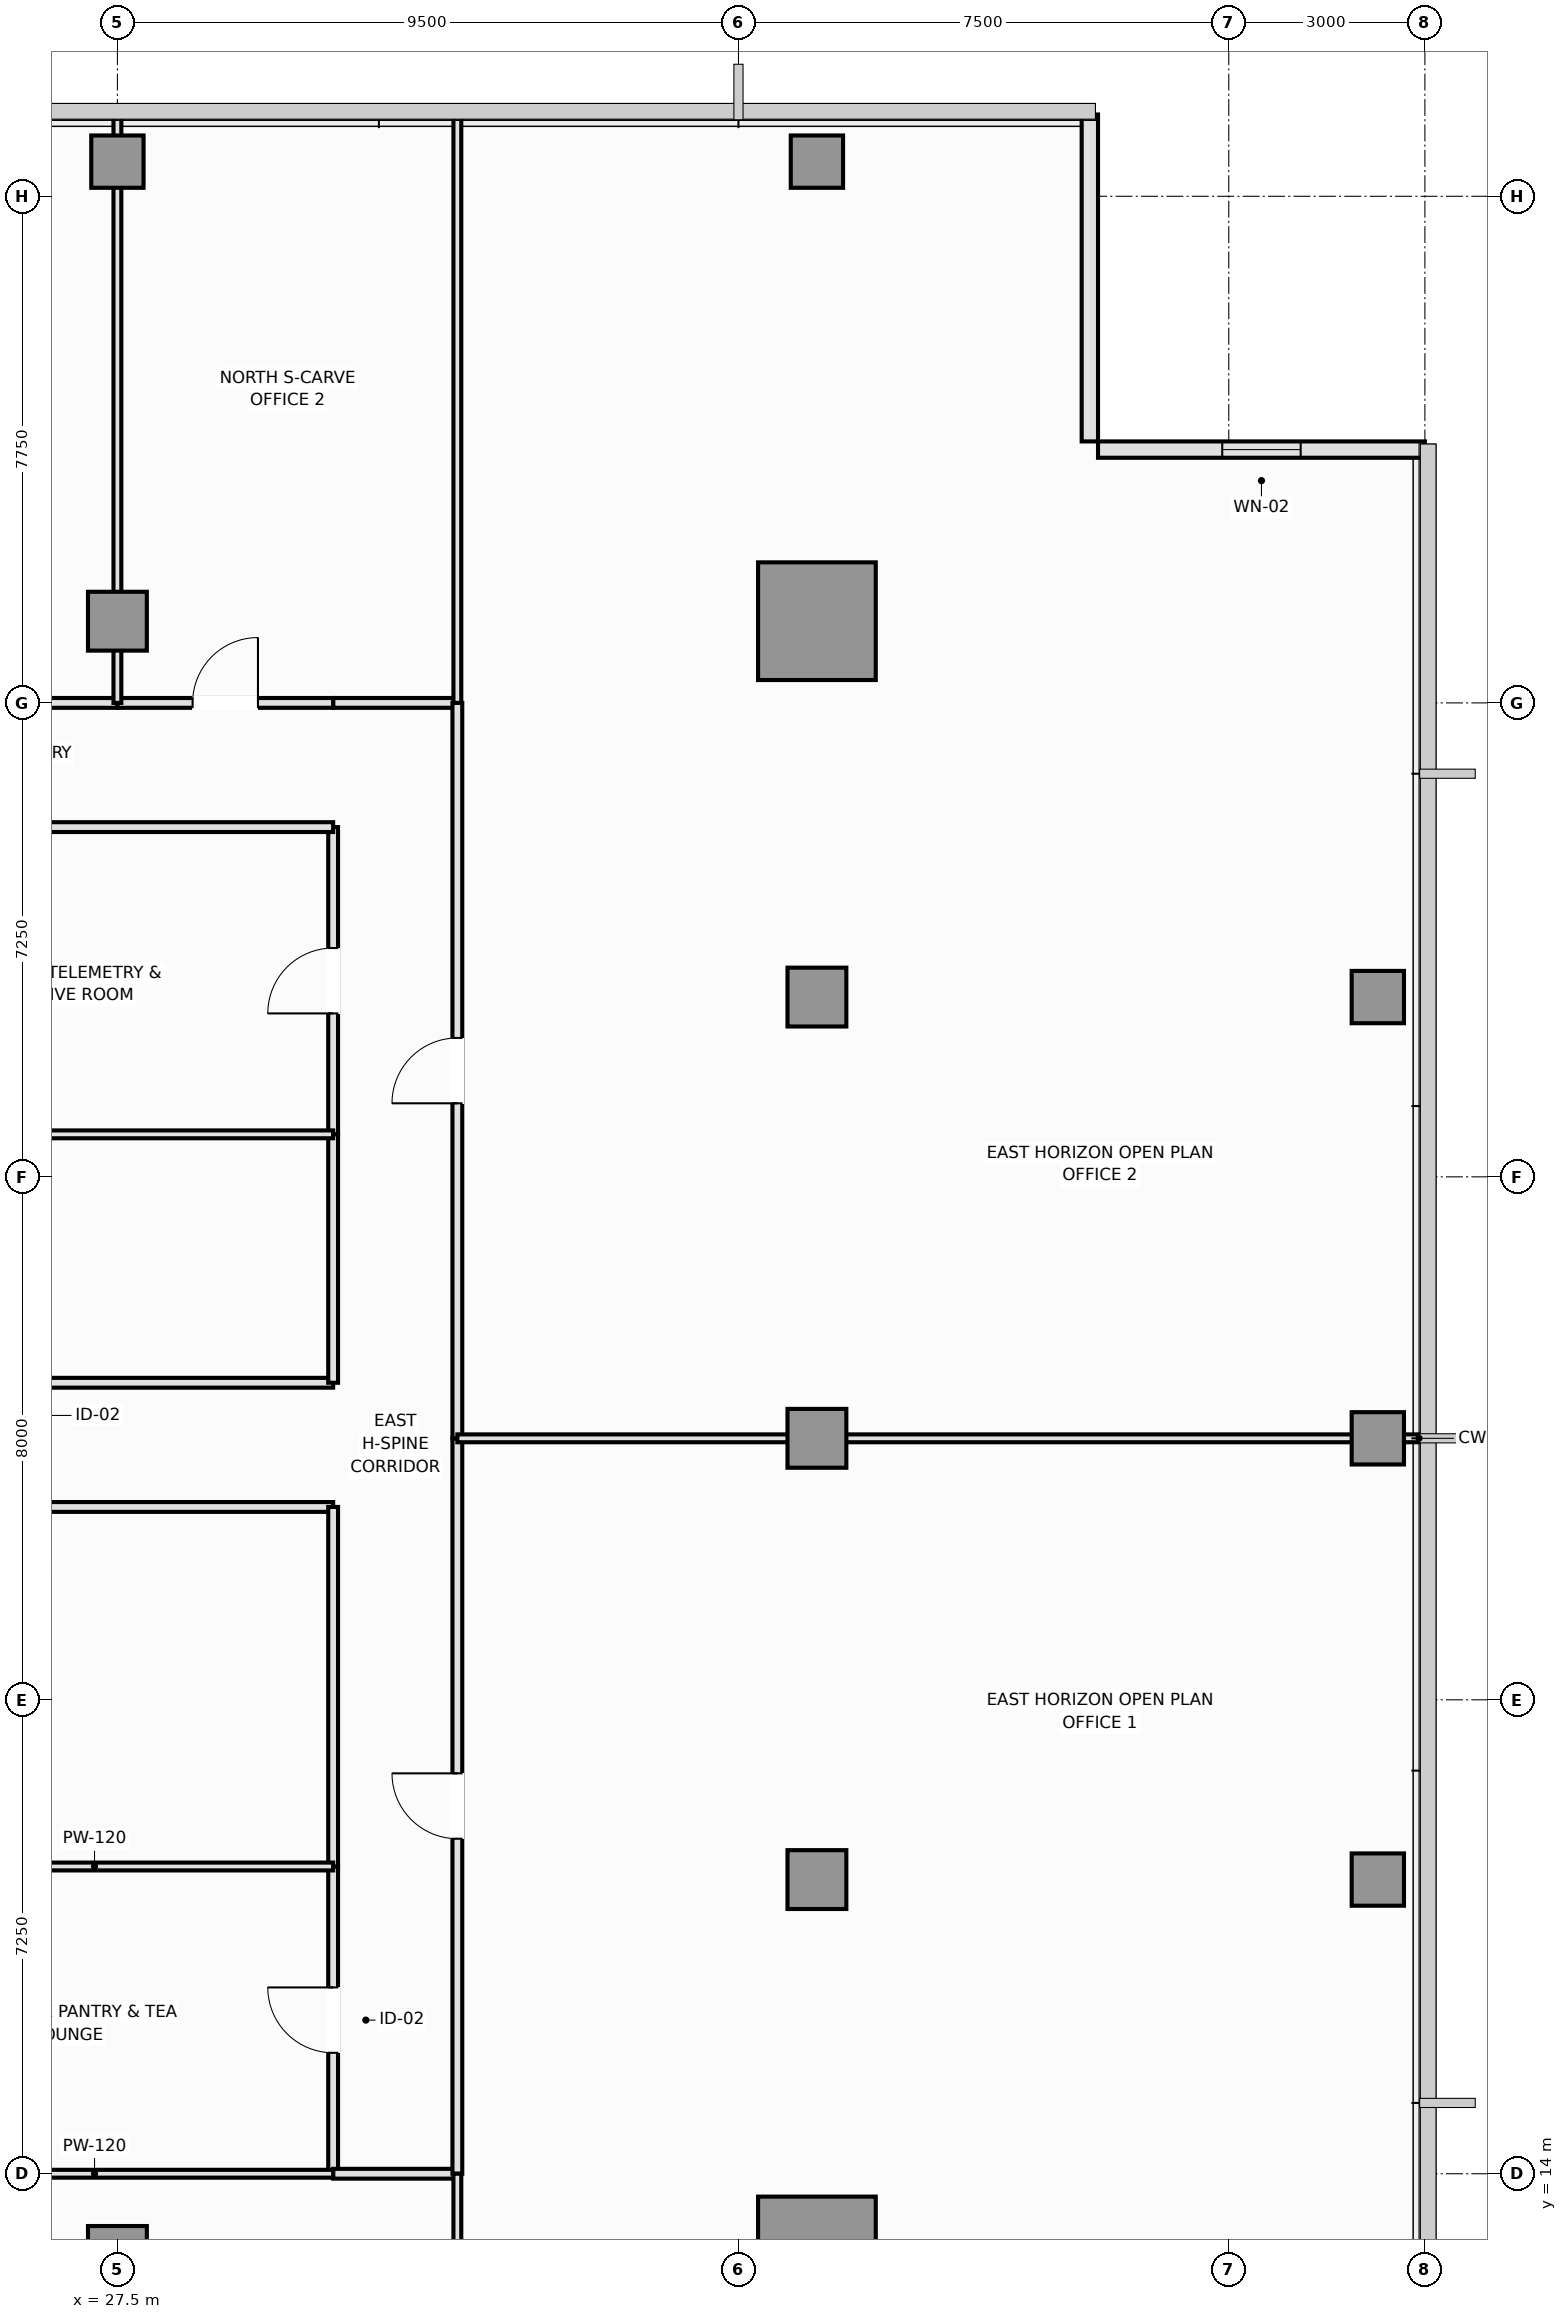
"""IFC4 building model, lengths in metres.
Left out: names, types, materials, properties, quantities, classifications, styles, units other than length and angle.
Written with IfcOpenShell. Run it as: python <this file> out.ifc"""

import sys

from ifc_helpers import new_model, si_unit, direction, frame, frame_2d, origin, origin_2d, place, context, subcontext, project, spatial, rectangle, extrude, element, fill, save


model = new_model("IFC4")
c1 = context("Model", 3, precision=1e-05, world=origin(), true_north=direction((0.0, 1.0)))
c2 = subcontext(c1, "Body", "Model", "MODEL_VIEW")
j1 = project(units=[si_unit("LENGTHUNIT", "METRE"), si_unit("PLANEANGLEUNIT", "RADIAN")], contexts=[c1])
p1 = place(None, origin())
s1 = spatial("IfcSite", under=j1, at=p1, CompositionType="ELEMENT")
p2 = place(p1, origin())
s2 = spatial("IfcBuilding", under=s1, at=p2, CompositionType="ELEMENT")
p3 = place(p2, frame((0.0, 0.0, 188.05)))
s3 = spatial("IfcBuildingStorey", under=s2, at=p3, CompositionType="ELEMENT", Elevation=188.05)
for number, where, z_axis, x_axis in (
    (1, (38.2, 12.75, 0.0), (0.0, 0.0, 1.0), (1.0, 0.0, 0.0)),
    (2, (38.2, 37.75, 0.0), (0.0, 0.0, 1.0), (1.0, 0.0, 0.0)),
):
    element("IfcColumn", number, at=place(p3, frame(where, z_axis=z_axis, x_axis=x_axis)), inside=s3, PredefinedType="COLUMN", context=c2, shape_type="SweptSolid", body=[
        extrude(rectangle(XDim=1.8, YDim=1.8, at=origin_2d()), origin(), (0.0, 0.0, 1.0), 3.55),
    ])
for number, where, z_axis, x_axis in (
    (3, (27.5, 12.75, 0.0), (0.0, 0.0, 1.0), (1.0, 0.0, 0.0)),
    (4, (27.5, 37.75, 0.0), (0.0, 0.0, 1.0), (1.0, 0.0, 0.0)),
    (5, (38.2, 18.5, 0.0), (0.0, 0.0, 1.0), (1.0, 0.0, 0.0)),
    (6, (38.2, 25.25, 0.0), (0.0, 0.0, 1.0), (1.0, 0.0, 0.0)),
    (7, (38.2, 32.0, 0.0), (0.0, 0.0, 1.0), (1.0, 0.0, 0.0)),
):
    element("IfcColumn", number, at=place(p3, frame(where, z_axis=z_axis, x_axis=x_axis)), inside=s3, PredefinedType="COLUMN", context=c2, shape_type="SweptSolid", body=[
        extrude(rectangle(XDim=0.9, YDim=0.9, at=origin_2d()), origin(), (0.0, 0.0, 1.0), 3.55),
    ])
for number, where, z_axis, x_axis in (
    (8, (46.78, 18.5, 0.0), (0.0, 0.0, 1.0), (1.0, 0.0, 0.0)),
    (9, (46.78, 25.25, 0.0), (0.0, 0.0, 1.0), (1.0, 0.0, 0.0)),
    (10, (46.78, 32.0, 0.0), (0.0, 0.0, 1.0), (1.0, 0.0, 0.0)),
    (11, (27.5, 44.78, 0.0), (0.0, 0.0, 1.0), (1.0, 0.0, 0.0)),
    (12, (38.2, 44.78, 0.0), (0.0, 0.0, 1.0), (1.0, 0.0, 0.0)),
):
    element("IfcColumn", number, at=place(p3, frame(where, z_axis=z_axis, x_axis=x_axis)), inside=s3, PredefinedType="COLUMN", context=c2, shape_type="SweptSolid", body=[
        extrude(rectangle(XDim=0.8, YDim=0.8, at=origin_2d()), origin(), (0.0, 0.0, 1.0), 3.55),
    ])
p4 = place(p3, frame((47.5, 40.375, 0.0), z_axis=(0.0, 0.0, 1.0), x_axis=(-1.0, 0.0, 0.0)))
e13 = element("IfcWall", 13, at=p4, inside=s3, PredefinedType="SOLIDWALL", context=c2, shape_type="SweptSolid", body=[
    extrude(rectangle(XDim=5.0, YDim=0.25, at=frame_2d((2.5, 0.0))), origin(), (0.0, 0.0, 1.0), 3.37),
])
p5 = place(p4, frame((1.9, 0.0, 0.9)))
e14 = element("IfcOpeningElement", 14, at=p5, cuts=e13, PredefinedType="OPENING", context=c2, shape_type="SweptSolid", body=[
    extrude(rectangle(XDim=1.2, YDim=1.8, at=frame_2d((0.6, 0.9))), frame((0.0, 0.135, 0.0), z_axis=(0.0, -1.0, 0.0), x_axis=(1.0, 0.0, 0.0)), (0.0, 0.0, 1.0), 0.27),
])
p6 = place(p3, frame((42.375, 40.5, 0.0), z_axis=(0.0, 0.0, 1.0), x_axis=(0.0, 1.0, 0.0)))
e15 = element("IfcWall", 15, at=p6, inside=s3, PredefinedType="SOLIDWALL", context=c2, shape_type="SweptSolid", body=[
    extrude(rectangle(XDim=5.0, YDim=0.25, at=frame_2d((2.5, 0.0))), origin(), (0.0, 0.0, 1.0), 3.37),
])
p7 = place(p3, frame((19.9, 24.2, 0.0), z_axis=(0.0, 0.0, 1.0), x_axis=(1.0, 0.0, 0.0)))
e16 = element("IfcWall", 16, at=p7, inside=s3, PredefinedType="PARTITIONING", context=c2, shape_type="SweptSolid", body=[
    extrude(rectangle(XDim=10.9, YDim=0.15, at=frame_2d((5.45, 0.0))), origin(), (0.0, 0.0, 1.0), 3.37),
])
p8 = place(p7, frame((4.95, 0.0, 0.0)))
e17 = element("IfcOpeningElement", 17, at=p8, cuts=e16, PredefinedType="OPENING", context=c2, shape_type="SweptSolid", body=[
    extrude(rectangle(XDim=1.0, YDim=2.15, at=frame_2d((0.5, 1.075))), frame((0.0, 0.085, 0.0), z_axis=(0.0, -1.0, 0.0), x_axis=(1.0, 0.0, 0.0)), (0.0, 0.0, 1.0), 0.17),
])
p9 = place(p3, frame((19.9, 26.1, 0.0), z_axis=(0.0, 0.0, 1.0), x_axis=(1.0, 0.0, 0.0)))
e18 = element("IfcWall", 18, at=p9, inside=s3, PredefinedType="PARTITIONING", context=c2, shape_type="SweptSolid", body=[
    extrude(rectangle(XDim=10.9, YDim=0.15, at=frame_2d((5.45, 0.0))), origin(), (0.0, 0.0, 1.0), 3.37),
])
p10 = place(p9, frame((4.95, 0.0, 0.0)))
e19 = element("IfcOpeningElement", 19, at=p10, cuts=e18, PredefinedType="OPENING", context=c2, shape_type="SweptSolid", body=[
    extrude(rectangle(XDim=1.0, YDim=2.15, at=frame_2d((0.5, 1.075))), frame((0.0, 0.085, 0.0), z_axis=(0.0, -1.0, 0.0), x_axis=(1.0, 0.0, 0.0)), (0.0, 0.0, 1.0), 0.17),
])
p11 = place(p3, frame((30.8, 14.0, 0.0), z_axis=(0.0, 0.0, 1.0), x_axis=(0.0, 1.0, 0.0)))
e20 = element("IfcWall", 20, at=p11, inside=s3, PredefinedType="PARTITIONING", context=c2, shape_type="SweptSolid", body=[
    extrude(rectangle(XDim=4.7, YDim=0.15, at=frame_2d((2.35, 0.0))), origin(), (0.0, 0.0, 1.0), 3.37),
])
p12 = place(p11, frame((1.85, 0.0, 0.0)))
e21 = element("IfcOpeningElement", 21, at=p12, cuts=e20, PredefinedType="OPENING", context=c2, shape_type="SweptSolid", body=[
    extrude(rectangle(XDim=1.0, YDim=2.15, at=frame_2d((0.5, 1.075))), frame((0.0, 0.085, 0.0), z_axis=(0.0, -1.0, 0.0), x_axis=(1.0, 0.0, 0.0)), (0.0, 0.0, 1.0), 0.17),
])
p13 = place(p3, frame((30.8, 29.9, 0.0), z_axis=(0.0, 0.0, 1.0), x_axis=(0.0, 1.0, 0.0)))
e22 = element("IfcWall", 22, at=p13, inside=s3, PredefinedType="PARTITIONING", context=c2, shape_type="SweptSolid", body=[
    extrude(rectangle(XDim=4.7, YDim=0.15, at=frame_2d((2.35, 0.0))), origin(), (0.0, 0.0, 1.0), 3.37),
])
p14 = place(p13, frame((1.85, 0.0, 0.0)))
e23 = element("IfcOpeningElement", 23, at=p14, cuts=e22, PredefinedType="OPENING", context=c2, shape_type="SweptSolid", body=[
    extrude(rectangle(XDim=1.0, YDim=2.15, at=frame_2d((0.5, 1.075))), frame((0.0, 0.085, 0.0), z_axis=(0.0, -1.0, 0.0), x_axis=(1.0, 0.0, 0.0)), (0.0, 0.0, 1.0), 0.17),
])
p15 = place(p3, frame((30.8, 18.7, 0.0), z_axis=(0.0, 0.0, 1.0), x_axis=(0.0, 1.0, 0.0)))
e24 = element("IfcWall", 24, at=p15, inside=s3, PredefinedType="PARTITIONING", context=c2, shape_type="SweptSolid", body=[
    extrude(rectangle(XDim=5.5, YDim=0.15, at=frame_2d((2.75, 0.0))), origin(), (0.0, 0.0, 1.0), 3.37),
])
p16 = place(p3, frame((30.8, 26.1, 0.0), z_axis=(0.0, 0.0, 1.0), x_axis=(0.0, 1.0, 0.0)))
e25 = element("IfcWall", 25, at=p16, inside=s3, PredefinedType="PARTITIONING", context=c2, shape_type="SweptSolid", body=[
    extrude(rectangle(XDim=3.8, YDim=0.15, at=frame_2d((1.9, 0.0))), origin(), (0.0, 0.0, 1.0), 3.37),
])
for number, where, z_axis, x_axis in (
    (26, (30.8, 14.0, 0.0), (0.0, 0.0, 1.0), (1.0, 0.0, 0.0)),
    (27, (30.8, 36.5, 0.0), (0.0, 0.0, 1.0), (1.0, 0.0, 0.0)),
):
    element("IfcWall", number, at=place(p3, frame(where, z_axis=z_axis, x_axis=x_axis)), inside=s3, PredefinedType="PARTITIONING", context=c2, shape_type="SweptSolid", body=[
        extrude(rectangle(XDim=1.9, YDim=0.15, at=frame_2d((0.95, 0.0))), origin(), (0.0, 0.0, 1.0), 3.37),
    ])
p17 = place(p3, frame((32.7, 14.0, 0.0), z_axis=(0.0, 0.0, 1.0), x_axis=(0.0, 1.0, 0.0)))
e28 = element("IfcWall", 28, at=p17, inside=s3, PredefinedType="PARTITIONING", context=c2, shape_type="SweptSolid", body=[
    extrude(rectangle(XDim=11.25, YDim=0.15, at=frame_2d((5.625, 0.0))), origin(), (0.0, 0.0, 1.0), 3.37),
])
p18 = place(p17, frame((5.125, 0.0, 0.0)))
e29 = element("IfcOpeningElement", 29, at=p18, cuts=e28, PredefinedType="OPENING", context=c2, shape_type="SweptSolid", body=[
    extrude(rectangle(XDim=1.0, YDim=2.15, at=frame_2d((0.5, 1.075))), frame((0.0, 0.085, 0.0), z_axis=(0.0, -1.0, 0.0), x_axis=(1.0, 0.0, 0.0)), (0.0, 0.0, 1.0), 0.17),
])
p19 = place(p3, frame((32.7, 25.25, 0.0), z_axis=(0.0, 0.0, 1.0), x_axis=(0.0, 1.0, 0.0)))
e30 = element("IfcWall", 30, at=p19, inside=s3, PredefinedType="PARTITIONING", context=c2, shape_type="SweptSolid", body=[
    extrude(rectangle(XDim=11.25, YDim=0.15, at=frame_2d((5.625, 0.0))), origin(), (0.0, 0.0, 1.0), 3.37),
])
p20 = place(p19, frame((5.125, 0.0, 0.0)))
e31 = element("IfcOpeningElement", 31, at=p20, cuts=e30, PredefinedType="OPENING", context=c2, shape_type="SweptSolid", body=[
    extrude(rectangle(XDim=1.0, YDim=2.15, at=frame_2d((0.5, 1.075))), frame((0.0, 0.085, 0.0), z_axis=(0.0, -1.0, 0.0), x_axis=(1.0, 0.0, 0.0)), (0.0, 0.0, 1.0), 0.17),
])
p21 = place(p3, frame((23.5, 34.6, 0.0), z_axis=(0.0, 0.0, 1.0), x_axis=(1.0, 0.0, 0.0)))
e32 = element("IfcWall", 32, at=p21, inside=s3, PredefinedType="PARTITIONING", context=c2, shape_type="SweptSolid", body=[
    extrude(rectangle(XDim=7.3, YDim=0.15, at=frame_2d((3.65, 0.0))), origin(), (0.0, 0.0, 1.0), 3.37),
])
p22 = place(p3, frame((19.9, 36.5, 0.0), z_axis=(0.0, 0.0, 1.0), x_axis=(1.0, 0.0, 0.0)))
e33 = element("IfcWall", 33, at=p22, inside=s3, PredefinedType="PARTITIONING", context=c2, shape_type="SweptSolid", body=[
    extrude(rectangle(XDim=7.6, YDim=0.15, at=frame_2d((3.8, 0.0))), origin(), (0.0, 0.0, 1.0), 3.37),
])
p23 = place(p3, frame((27.5, 36.5, 0.0), z_axis=(0.0, 0.0, 1.0), x_axis=(1.0, 0.0, 0.0)))
e34 = element("IfcWall", 34, at=p23, inside=s3, PredefinedType="PARTITIONING", context=c2, shape_type="SweptSolid", body=[
    extrude(rectangle(XDim=3.3, YDim=0.15, at=frame_2d((1.65, 0.0))), origin(), (0.0, 0.0, 1.0), 3.37),
])
p24 = place(p23, frame((1.15, 0.0, 0.0)))
e35 = element("IfcOpeningElement", 35, at=p24, cuts=e34, PredefinedType="OPENING", context=c2, shape_type="SweptSolid", body=[
    extrude(rectangle(XDim=1.0, YDim=2.15, at=frame_2d((0.5, 1.075))), frame((0.0, 0.085, 0.0), z_axis=(0.0, -1.0, 0.0), x_axis=(1.0, 0.0, 0.0)), (0.0, 0.0, 1.0), 0.17),
])
for number, where, z_axis, x_axis in (
    (36, (23.5, 18.7, 0.0), (0.0, 0.0, 1.0), (1.0, 0.0, 0.0)),
    (37, (23.5, 14.0, 0.0), (0.0, 0.0, 1.0), (1.0, 0.0, 0.0)),
    (38, (23.5, 29.9, 0.0), (0.0, 0.0, 1.0), (1.0, 0.0, 0.0)),
):
    element("IfcWall", number, at=place(p3, frame(where, z_axis=z_axis, x_axis=x_axis)), inside=s3, PredefinedType="PARTITIONING", context=c2, shape_type="SweptSolid", body=[
        extrude(rectangle(XDim=7.3, YDim=0.12, at=frame_2d((3.65, 0.0))), origin(), (0.0, 0.0, 1.0), 3.37),
    ])
p25 = place(p3, frame((32.7, 5.01, 0.0), z_axis=(0.0, 0.0, 1.0), x_axis=(0.0, 1.0, 0.0)))
e39 = element("IfcWall", 39, at=p25, inside=s3, PredefinedType="PARTITIONING", context=c2, shape_type="SweptSolid", body=[
    extrude(rectangle(XDim=8.99, YDim=0.12, at=frame_2d((4.495, 0.0))), origin(), (0.0, 0.0, 1.0), 3.37),
])
p26 = place(p3, frame((27.5, 36.5, 0.0), z_axis=(0.0, 0.0, 1.0), x_axis=(0.0, 1.0, 0.0)))
e40 = element("IfcWall", 40, at=p26, inside=s3, PredefinedType="PARTITIONING", context=c2, shape_type="SweptSolid", body=[
    extrude(rectangle(XDim=8.99, YDim=0.12, at=frame_2d((4.495, 0.0))), origin(), (0.0, 0.0, 1.0), 2.92),
])
p27 = place(p3, frame((32.7, 36.5, 0.0), z_axis=(0.0, 0.0, 1.0), x_axis=(0.0, 1.0, 0.0)))
e41 = element("IfcWall", 41, at=p27, inside=s3, PredefinedType="PARTITIONING", context=c2, shape_type="SweptSolid", body=[
    extrude(rectangle(XDim=8.99, YDim=0.12, at=frame_2d((4.495, 0.0))), origin(), (0.0, 0.0, 1.0), 3.37),
])
p28 = place(p3, frame((32.7, 25.25, 0.0), z_axis=(0.0, 0.0, 1.0), x_axis=(1.0, 0.0, 0.0)))
e42 = element("IfcWall", 42, at=p28, inside=s3, PredefinedType="PARTITIONING", context=c2, shape_type="SweptSolid", body=[
    extrude(rectangle(XDim=14.79, YDim=0.12, at=frame_2d((7.395, 0.0))), origin(), (0.0, 0.0, 1.0), 2.87),
])
p29 = place(p5, origin())
e43 = element("IfcWindow", 43, at=p29, inside=s3, PartitioningType="SINGLE_PANEL", PredefinedType="WINDOW", context=c2, shape_type="SweptSolid", body=[
    extrude(rectangle(XDim=1.2, YDim=1.8, at=frame_2d((0.6, 0.9))), frame((0.0, 0.03, 0.0), z_axis=(0.0, -1.0, 0.0), x_axis=(1.0, 0.0, 0.0)), (0.0, 0.0, 1.0), 0.06),
])
fill(e14, e43)
p30 = place(p12, origin())
e44 = element("IfcDoor", 44, at=p30, inside=s3, OperationType="SINGLE_SWING_RIGHT", PredefinedType="DOOR", context=c2, shape_type="SweptSolid", body=[
    extrude(rectangle(XDim=1.0, YDim=2.15, at=frame_2d((0.5, 1.075))), frame((0.0, 0.025, 0.0), z_axis=(0.0, -1.0, 0.0), x_axis=(1.0, 0.0, 0.0)), (0.0, 0.0, 1.0), 0.05),
])
fill(e21, e44)
p31 = place(p14, origin())
e45 = element("IfcDoor", 45, at=p31, inside=s3, OperationType="SINGLE_SWING_LEFT", PredefinedType="DOOR", context=c2, shape_type="SweptSolid", body=[
    extrude(rectangle(XDim=1.0, YDim=2.15, at=frame_2d((0.5, 1.075))), frame((0.0, 0.025, 0.0), z_axis=(0.0, -1.0, 0.0), x_axis=(1.0, 0.0, 0.0)), (0.0, 0.0, 1.0), 0.05),
])
fill(e23, e45)
p32 = place(p18, origin())
e46 = element("IfcDoor", 46, at=p32, inside=s3, OperationType="SINGLE_SWING_RIGHT", PredefinedType="DOOR", context=c2, shape_type="SweptSolid", body=[
    extrude(rectangle(XDim=1.0, YDim=2.15, at=frame_2d((0.5, 1.075))), frame((0.0, 0.025, 0.0), z_axis=(0.0, -1.0, 0.0), x_axis=(1.0, 0.0, 0.0)), (0.0, 0.0, 1.0), 0.05),
])
fill(e29, e46)
p33 = place(p20, origin())
e47 = element("IfcDoor", 47, at=p33, inside=s3, OperationType="SINGLE_SWING_LEFT", PredefinedType="DOOR", context=c2, shape_type="SweptSolid", body=[
    extrude(rectangle(XDim=1.0, YDim=2.15, at=frame_2d((0.5, 1.075))), frame((0.0, 0.025, 0.0), z_axis=(0.0, -1.0, 0.0), x_axis=(1.0, 0.0, 0.0)), (0.0, 0.0, 1.0), 0.05),
])
fill(e31, e47)
p34 = place(p24, origin())
e48 = element("IfcDoor", 48, at=p34, inside=s3, OperationType="SINGLE_SWING_RIGHT", PredefinedType="DOOR", context=c2, shape_type="SweptSolid", body=[
    extrude(rectangle(XDim=1.0, YDim=2.15, at=frame_2d((0.5, 1.075))), frame((0.0, 0.025, 0.0), z_axis=(0.0, -1.0, 0.0), x_axis=(1.0, 0.0, 0.0)), (0.0, 0.0, 1.0), 0.05),
])
fill(e35, e48)
save(model, sys.argv[1])
